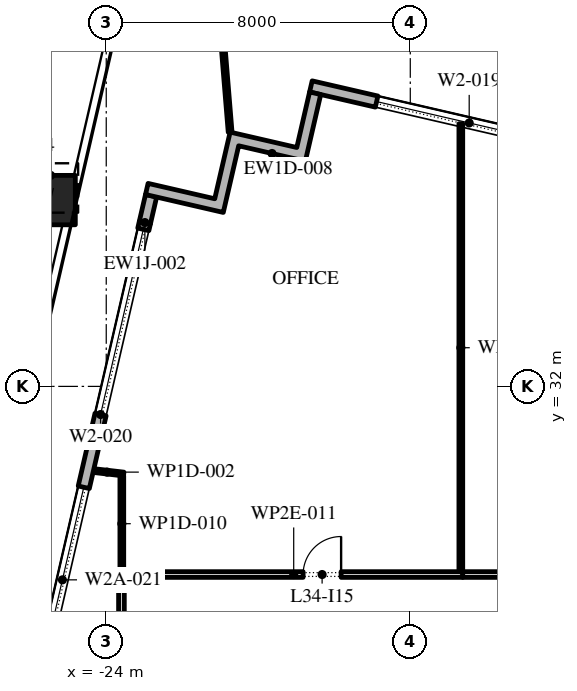
"""IFC4 building model, lengths in metres.
Left out: names, types, materials, properties, quantities, classifications, styles, units other than length and angle.
Written with IfcOpenShell. Run it as: python <this file> out.ifc"""

import sys

from ifc_helpers import new_model, si_unit, direction, frame, frame_2d, origin, origin_2d, place, context, subcontext, project, spatial, polyline, rectangle, outline, extrude, element, fill, save


model = new_model("IFC4")
c1 = context("Model", 3, precision=1e-05, world=origin(), true_north=direction((0.0, 1.0)))
c2 = subcontext(c1, "Body", "Model", "MODEL_VIEW")
j1 = project(units=[si_unit("LENGTHUNIT", "METRE"), si_unit("PLANEANGLEUNIT", "RADIAN")], contexts=[c1])
p1 = place(None, origin())
s1 = spatial("IfcSite", under=j1, at=p1, CompositionType="ELEMENT")
p2 = place(p1, origin())
s2 = spatial("IfcBuilding", under=s1, at=p2, CompositionType="ELEMENT")
p3 = place(p2, frame((0.0, 0.0, 156.0)))
s3 = spatial("IfcBuildingStorey", under=s2, at=p3, CompositionType="ELEMENT", Elevation=156.0)
p4 = place(p3, frame((-25.464, 36.902, 0.0), z_axis=(0.017502025619, 0.075687567741, 0.996977969259), x_axis=(-0.974290512438, 0.225295355862, 0.0)))
e1 = element("IfcColumn", 1, at=p4, inside=s3, PredefinedType="COLUMN", context=c2, shape_type="SweptSolid", body=[
    extrude(rectangle(XDim=1.3, YDim=1.3, at=origin_2d()), origin(), (0.0, 0.0, 1.0), 4.213),
])
p5 = place(p3, frame((31.078, 28.421, 0.0), z_axis=(0.0, 0.0, 1.0), x_axis=(-0.974370456532, 0.224949357493, 0.0)))
e2 = element("IfcWall", 2, at=p5, inside=s3, PredefinedType="STANDARD", context=c2, shape_type="SweptSolid", body=[
    extrude(rectangle(XDim=51.0, YDim=0.3, at=frame_2d((25.5, 0.0))), origin(), (0.0, 0.0, 1.0), 3.9),
])
p6 = place(p5, frame((1.625, 0.0, 0.45)))
e3 = element("IfcOpeningElement", 3, at=p6, cuts=e2, PredefinedType="OPENING", context=c2, shape_type="SweptSolid", body=[
    extrude(rectangle(XDim=5.0, YDim=2.725, at=frame_2d((2.5, 1.363))), frame((0.0, 0.16, 0.0), z_axis=(0.0, -1.0, 0.0), x_axis=(1.0, 0.0, 0.0)), (0.0, 0.0, 1.0), 0.32),
])
p7 = place(p5, frame((10.025, 0.0, 0.45)))
e4 = element("IfcOpeningElement", 4, at=p7, cuts=e2, PredefinedType="OPENING", context=c2, shape_type="SweptSolid", body=[
    extrude(rectangle(XDim=5.0, YDim=2.65, at=frame_2d((2.5, 1.325))), frame((0.0, 0.16, 0.0), z_axis=(0.0, -1.0, 0.0), x_axis=(1.0, 0.0, 0.0)), (0.0, 0.0, 1.0), 0.32),
])
p8 = place(p5, frame((18.575, 0.0, 0.45)))
e5 = element("IfcOpeningElement", 5, at=p8, cuts=e2, PredefinedType="OPENING", context=c2, shape_type="SweptSolid", body=[
    extrude(rectangle(XDim=5.0, YDim=2.575, at=frame_2d((2.5, 1.288))), frame((0.0, 0.16, 0.0), z_axis=(0.0, -1.0, 0.0), x_axis=(1.0, 0.0, 0.0)), (0.0, 0.0, 1.0), 0.32),
])
p9 = place(p5, frame((28.425, 0.0, 0.0)))
e6 = element("IfcOpeningElement", 6, at=p9, cuts=e2, PredefinedType="OPENING", context=c2, shape_type="SweptSolid", body=[
    extrude(rectangle(XDim=2.4, YDim=3.5, at=frame_2d((1.2, 1.75))), frame((0.0, 0.16, 0.0), z_axis=(0.0, -1.0, 0.0), x_axis=(1.0, 0.0, 0.0)), (0.0, 0.0, 1.0), 0.32),
])
p10 = place(p5, frame((35.675, 0.0, 0.45)))
e7 = element("IfcOpeningElement", 7, at=p10, cuts=e2, PredefinedType="OPENING", context=c2, shape_type="SweptSolid", body=[
    extrude(rectangle(XDim=5.0, YDim=2.4, at=frame_2d((2.5, 1.2))), frame((0.0, 0.16, 0.0), z_axis=(0.0, -1.0, 0.0), x_axis=(1.0, 0.0, 0.0)), (0.0, 0.0, 1.0), 0.32),
])
p11 = place(p5, frame((44.225, 0.0, 0.45)))
e8 = element("IfcOpeningElement", 8, at=p11, cuts=e2, PredefinedType="OPENING", context=c2, shape_type="SweptSolid", body=[
    extrude(rectangle(XDim=5.0, YDim=3.25, at=frame_2d((2.5, 1.625))), frame((0.0, 0.16, 0.0), z_axis=(0.0, -1.0, 0.0), x_axis=(1.0, 0.0, 0.0)), (0.0, 0.0, 1.0), 0.32),
])
p12 = place(p3, frame((-22.82, 37.016, 0.0), z_axis=(0.0, 0.0, 1.0), x_axis=(-0.225031983597, -0.974351377255, 0.0)))
e9 = element("IfcWall", 9, at=p12, inside=s3, PredefinedType="STANDARD", context=c2, shape_type="SweptSolid", body=[
    extrude(rectangle(XDim=0.724, YDim=0.3, at=frame_2d((0.362, 0.0))), origin(), (0.0, 0.0, 1.0), 2.93),
])
p13 = place(p3, origin())
e10 = element("IfcWall", 10, at=p13, inside=s3, PredefinedType="STANDARD", context=c2, shape_type="SweptSolid", body=[
    extrude(outline(polyline([(-22.967, 37.049), (-22.899, 37.342), (-21.145, 36.937), (-20.74, 38.691), (-18.986, 38.286), (-18.649, 39.747), (-18.357, 39.68), (-18.762, 37.926), (-20.515, 38.331), (-20.92, 36.577), (-22.967, 37.049)])), origin(), (0.0, 0.0, 1.0), 3.9),
])
p14 = place(p3, frame((-20.74, 38.691, -0.05), z_axis=(0.0, 0.0, 1.0), x_axis=(-0.081681246263, 0.996658504207, 0.0)))
e11 = element("IfcWall", 11, at=p14, inside=s3, PredefinedType="STANDARD", context=c2, shape_type="SweptSolid", body=[
    extrude(rectangle(XDim=6.961, YDim=0.1, at=frame_2d((3.48, 0.0))), origin(), (0.0, 0.0, 1.0), 3.95),
])
p15 = place(p3, frame((-24.416, 29.795, 0.0), z_axis=(0.0, 0.0, 1.0), x_axis=(0.993440426076, -0.114350862868, 0.0)))
e12 = element("IfcWall", 12, at=p15, inside=s3, PredefinedType="PARTITIONING", context=c2, shape_type="SweptSolid", body=[
    extrude(rectangle(XDim=0.882, YDim=0.1, at=frame_2d((0.441, 0.0))), origin(), (0.0, 0.0, 1.0), 3.9),
])
p16 = place(p3, frame((-23.6, 16.53, 0.0), z_axis=(0.0, 0.0, 1.0), x_axis=(0.0, 1.0, 0.0)))
e13 = element("IfcWall", 13, at=p16, inside=s3, PredefinedType="PARTITIONING", context=c2, shape_type="SweptSolid", body=[
    extrude(rectangle(XDim=10.595, YDim=0.15, at=frame_2d((5.297, 0.0))), origin(), (0.0, 0.0, 1.0), 3.9),
])
p17 = place(p16, frame((4.62, 0.0, 0.0)))
e14 = element("IfcOpeningElement", 14, at=p17, cuts=e13, PredefinedType="OPENING", context=c2, shape_type="SweptSolid", body=[
    extrude(rectangle(XDim=1.0, YDim=2.1, at=frame_2d((0.5, 1.05))), frame((0.0, 0.085, 0.0), z_axis=(0.0, -1.0, 0.0), x_axis=(1.0, 0.0, 0.0)), (0.0, 0.0, 1.0), 0.17),
])
p18 = place(p3, frame((-23.59, 27.125, 0.0), z_axis=(0.0, 0.0, 1.0), x_axis=(0.0, 1.0, 0.0)))
e15 = element("IfcWall", 15, at=p18, inside=s3, PredefinedType="PARTITIONING", context=c2, shape_type="SweptSolid", body=[
    extrude(rectangle(XDim=2.525, YDim=0.1, at=frame_2d((1.262, 0.0))), origin(), (0.0, 0.0, 1.0), 3.9),
])
p19 = place(p3, frame((-23.515, 27.05, 0.0), z_axis=(0.0, 0.0, 1.0), x_axis=(1.0, 0.0, 0.0)))
e16 = element("IfcWall", 16, at=p19, inside=s3, PredefinedType="PARTITIONING", context=c2, shape_type="SweptSolid", body=[
    extrude(rectangle(XDim=8.895, YDim=0.15, at=frame_2d((4.447, 0.0))), origin(), (0.0, 0.0, 1.0), 3.9),
])
p20 = place(p19, frame((4.695, 0.0, 0.0)))
e17 = element("IfcOpeningElement", 17, at=p20, cuts=e16, PredefinedType="OPENING", context=c2, shape_type="SweptSolid", body=[
    extrude(rectangle(XDim=1.0, YDim=2.1, at=frame_2d((0.5, 1.05))), frame((0.0, 0.085, 0.0), z_axis=(0.0, -1.0, 0.0), x_axis=(1.0, 0.0, 0.0)), (0.0, 0.0, 1.0), 0.17),
])
p21 = place(p3, frame((-14.67, 27.125, 0.0), z_axis=(0.0, 0.0, 1.0), x_axis=(0.0, 1.0, 0.0)))
e18 = element("IfcWall", 18, at=p21, inside=s3, PredefinedType="PARTITIONING", context=c2, shape_type="SweptSolid", body=[
    extrude(rectangle(XDim=11.786, YDim=0.1, at=frame_2d((5.893, 0.0))), origin(), (0.0, 0.0, 1.0), 3.9),
])
p22 = place(p3, frame((-14.62, 27.05, 0.0), z_axis=(0.0, 0.0, 1.0), x_axis=(1.0, 0.0, 0.0)))
e19 = element("IfcWall", 19, at=p22, inside=s3, PredefinedType="PARTITIONING", context=c2, shape_type="SweptSolid", body=[
    extrude(rectangle(XDim=6.295, YDim=0.15, at=frame_2d((3.147, 0.0))), origin(), (0.0, 0.0, 1.0), 3.9),
])
p23 = place(p3, frame((-22.983, 36.311, 0.0), z_axis=(0.0, 0.0, 1.0), x_axis=(-0.224952722155, -0.974369679739, 0.0)))
e20 = element("IfcWall", 20, at=p23, inside=s3, PredefinedType="STANDARD", context=c2, shape_type="SweptSolid", body=[
    extrude(rectangle(XDim=48.777, YDim=0.3, at=frame_2d((24.388, 0.0))), origin(), (0.0, 0.0, 1.0), 3.9),
])
p24 = place(p23, frame((0.184, 0.0, 0.45)))
e21 = element("IfcOpeningElement", 21, at=p24, cuts=e20, PredefinedType="OPENING", context=c2, shape_type="SweptSolid", body=[
    extrude(rectangle(XDim=5.0, YDim=3.25, at=frame_2d((2.5, 1.625))), frame((0.0, 0.16, 0.0), z_axis=(0.0, -1.0, 0.0), x_axis=(1.0, 0.0, 0.0)), (0.0, 0.0, 1.0), 0.32),
])
p25 = place(p23, frame((7.148, 0.0, 0.45)))
e22 = element("IfcOpeningElement", 22, at=p25, cuts=e20, PredefinedType="OPENING", context=c2, shape_type="SweptSolid", body=[
    extrude(rectangle(XDim=5.0, YDim=2.95, at=frame_2d((2.5, 1.475))), frame((0.0, 0.16, 0.0), z_axis=(0.0, -1.0, 0.0), x_axis=(1.0, 0.0, 0.0)), (0.0, 0.0, 1.0), 0.32),
])
p26 = place(p23, frame((14.262, 0.0, 0.45)))
e23 = element("IfcOpeningElement", 23, at=p26, cuts=e20, PredefinedType="OPENING", context=c2, shape_type="SweptSolid", body=[
    extrude(rectangle(XDim=5.0, YDim=2.95, at=frame_2d((2.5, 1.475))), frame((0.0, 0.16, 0.0), z_axis=(0.0, -1.0, 0.0), x_axis=(1.0, 0.0, 0.0)), (0.0, 0.0, 1.0), 0.32),
])
p27 = place(p23, frame((22.677, 0.0, 0.0)))
e24 = element("IfcOpeningElement", 24, at=p27, cuts=e20, PredefinedType="OPENING", context=c2, shape_type="SweptSolid", body=[
    extrude(rectangle(XDim=2.4, YDim=3.5, at=frame_2d((1.2, 1.75))), frame((0.0, 0.16, 0.0), z_axis=(0.0, -1.0, 0.0), x_axis=(1.0, 0.0, 0.0)), (0.0, 0.0, 1.0), 0.32),
])
p28 = place(p23, frame((28.491, 0.0, 0.45)))
e25 = element("IfcOpeningElement", 25, at=p28, cuts=e20, PredefinedType="OPENING", context=c2, shape_type="SweptSolid", body=[
    extrude(rectangle(XDim=5.0, YDim=2.775, at=frame_2d((2.5, 1.387))), frame((0.0, 0.16, 0.0), z_axis=(0.0, -1.0, 0.0), x_axis=(1.0, 0.0, 0.0)), (0.0, 0.0, 1.0), 0.32),
])
p29 = place(p23, frame((35.605, 0.0, 0.45)))
e26 = element("IfcOpeningElement", 26, at=p29, cuts=e20, PredefinedType="OPENING", context=c2, shape_type="SweptSolid", body=[
    extrude(rectangle(XDim=5.0, YDim=2.575, at=frame_2d((2.5, 1.288))), frame((0.0, 0.16, 0.0), z_axis=(0.0, -1.0, 0.0), x_axis=(1.0, 0.0, 0.0)), (0.0, 0.0, 1.0), 0.32),
])
p30 = place(p23, frame((42.719, 0.0, 0.45)))
e27 = element("IfcOpeningElement", 27, at=p30, cuts=e20, PredefinedType="OPENING", context=c2, shape_type="SweptSolid", body=[
    extrude(rectangle(XDim=5.0, YDim=3.25, at=frame_2d((2.5, 1.625))), frame((0.0, 0.16, 0.0), z_axis=(0.0, -1.0, 0.0), x_axis=(1.0, 0.0, 0.0)), (0.0, 0.0, 1.0), 0.32),
])
p31 = place(p11, origin())
e28 = element("IfcWindow", 28, at=p31, inside=s3, PartitioningType="DOUBLE_PANEL_VERTICAL", PredefinedType="WINDOW", context=c2, shape_type="SweptSolid", body=[
    extrude(rectangle(XDim=5.0, YDim=3.25, at=frame_2d((2.5, 1.625))), frame((0.0, 0.03, 0.0), z_axis=(0.0, -1.0, 0.0), x_axis=(1.0, 0.0, 0.0)), (0.0, 0.0, 1.0), 0.06),
])
fill(e8, e28)
p32 = place(p24, origin())
e29 = element("IfcWindow", 29, at=p32, inside=s3, PartitioningType="DOUBLE_PANEL_VERTICAL", PredefinedType="WINDOW", context=c2, shape_type="SweptSolid", body=[
    extrude(rectangle(XDim=5.0, YDim=3.25, at=frame_2d((2.5, 1.625))), frame((0.0, 0.03, 0.0), z_axis=(0.0, -1.0, 0.0), x_axis=(1.0, 0.0, 0.0)), (0.0, 0.0, 1.0), 0.06),
])
fill(e21, e29)
p33 = place(p25, origin())
e30 = element("IfcWindow", 30, at=p33, inside=s3, PartitioningType="DOUBLE_PANEL_VERTICAL", PredefinedType="WINDOW", context=c2, shape_type="SweptSolid", body=[
    extrude(rectangle(XDim=5.0, YDim=2.95, at=frame_2d((2.5, 1.475))), frame((0.0, 0.03, 0.0), z_axis=(0.0, -1.0, 0.0), x_axis=(1.0, 0.0, 0.0)), (0.0, 0.0, 1.0), 0.06),
])
fill(e22, e30)
p34 = place(p20, origin())
e31 = element("IfcDoor", 31, at=p34, inside=s3, OperationType="SINGLE_SWING_LEFT", PredefinedType="DOOR", context=c2, shape_type="SweptSolid", body=[
    extrude(rectangle(XDim=1.0, YDim=2.1, at=frame_2d((0.5, 1.05))), frame((0.0, 0.025, 0.0), z_axis=(0.0, -1.0, 0.0), x_axis=(1.0, 0.0, 0.0)), (0.0, 0.0, 1.0), 0.05),
])
fill(e17, e31)
save(model, sys.argv[1])
